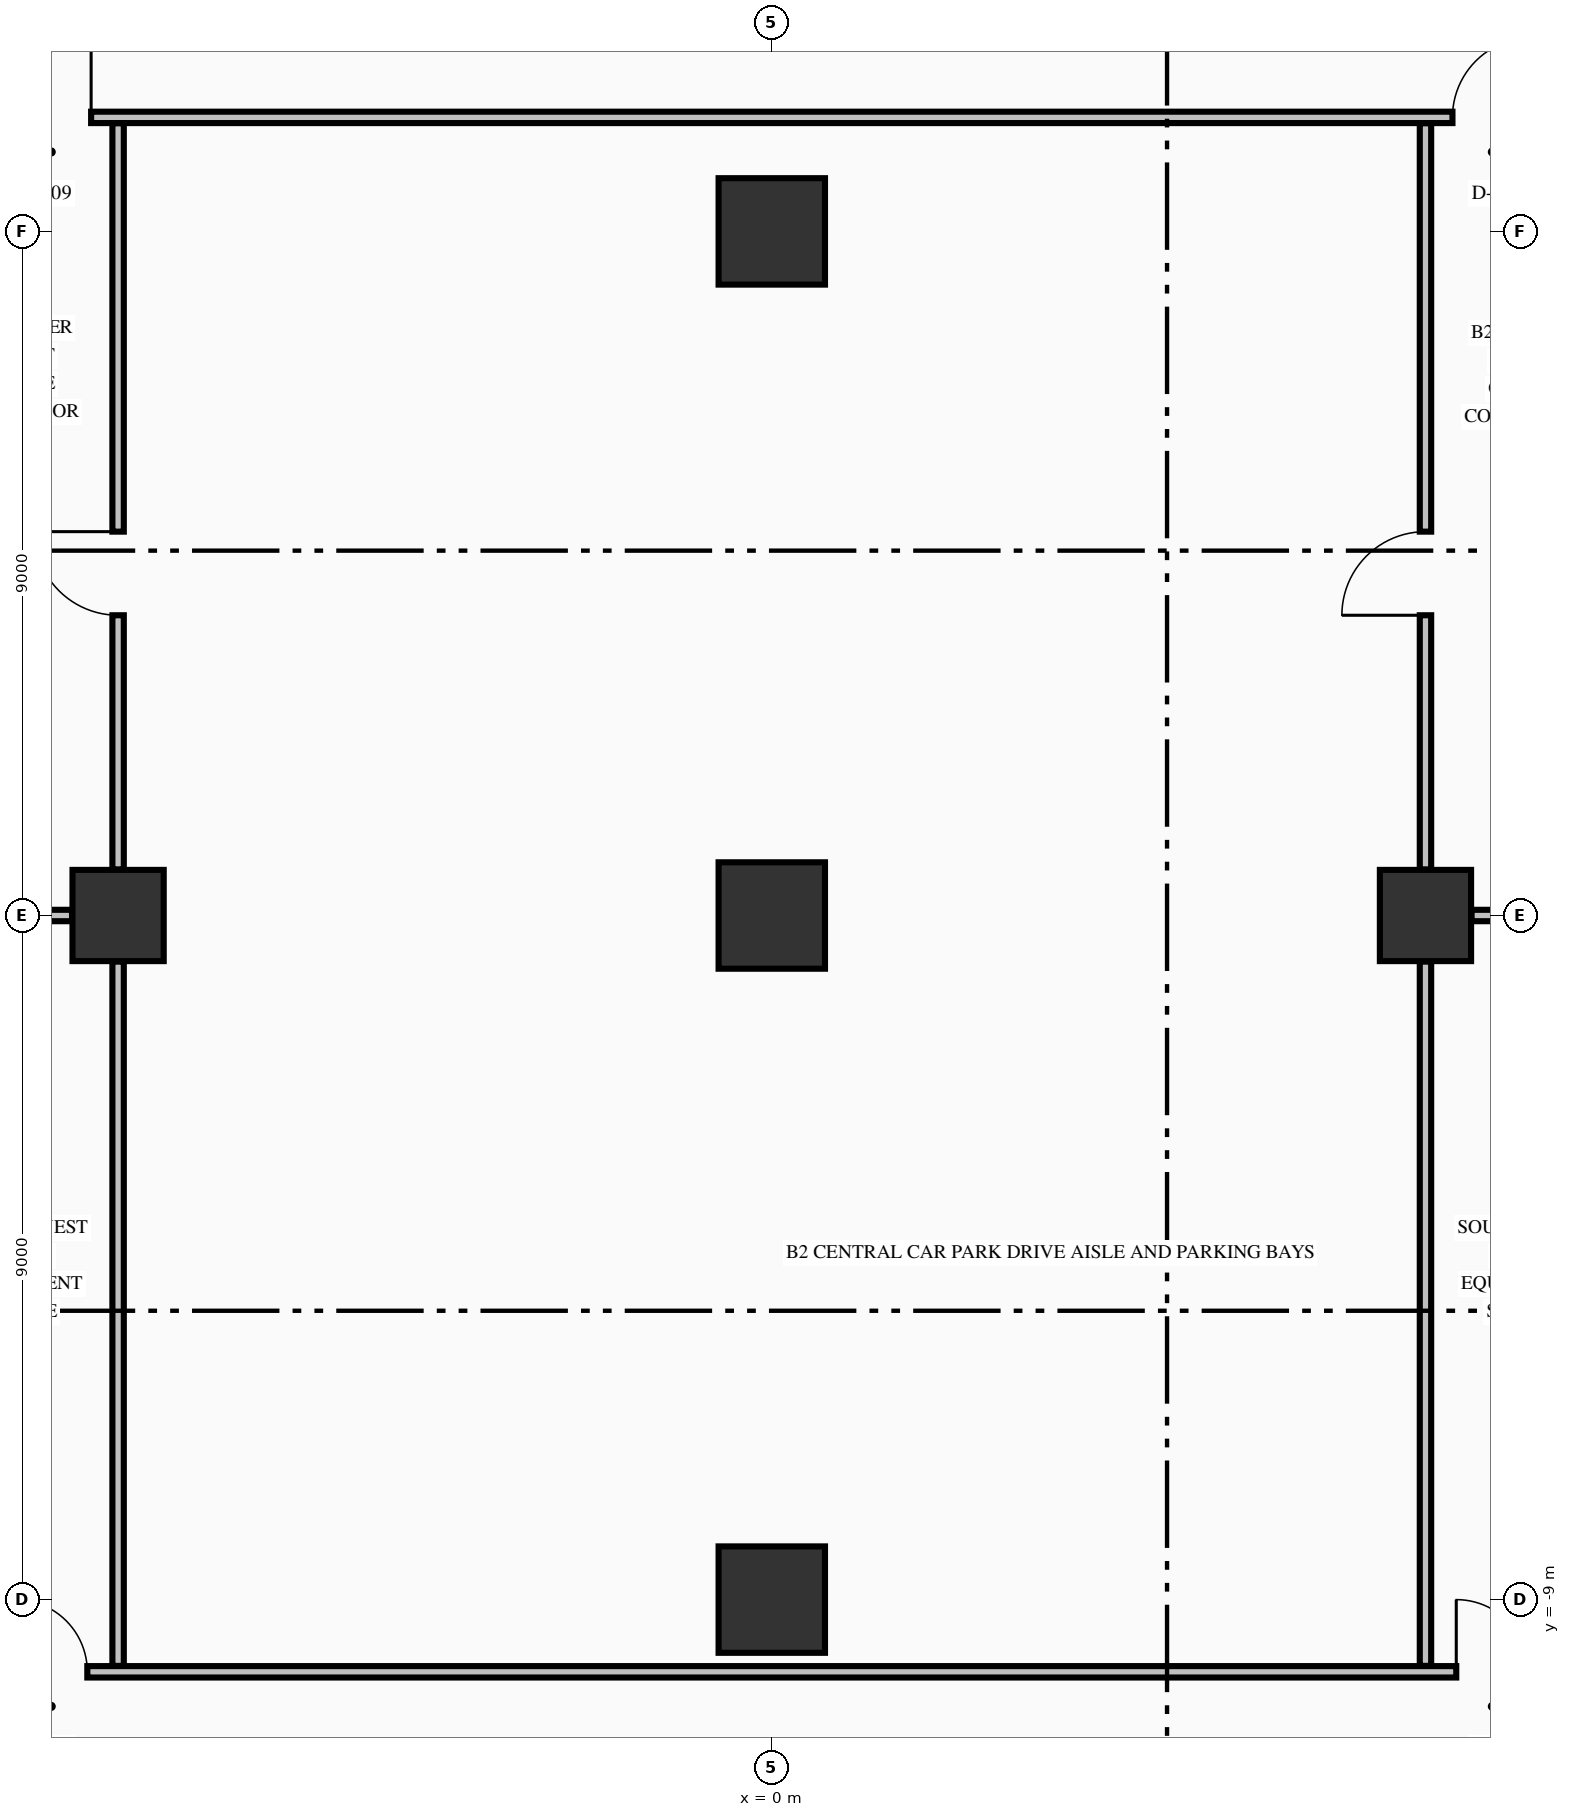
"""IFC4 building model, lengths in metres.
Left out: names, types, materials, properties, quantities, classifications, styles, units other than length and angle.
Written with IfcOpenShell. Run it as: python <this file> out.ifc"""

import sys

from ifc_helpers import new_model, si_unit, direction, frame, frame_2d, origin, origin_2d, place, context, subcontext, project, spatial, rectangle, extrude, element, fill, save


model = new_model("IFC4")
c1 = context("Model", 3, precision=1e-05, world=origin(), true_north=direction((0.0, 1.0)))
c2 = subcontext(c1, "Body", "Model", "MODEL_VIEW")
j1 = project(units=[si_unit("LENGTHUNIT", "METRE"), si_unit("PLANEANGLEUNIT", "RADIAN")], contexts=[c1])
p1 = place(None, origin())
s1 = spatial("IfcSite", under=j1, at=p1, CompositionType="ELEMENT")
p2 = place(p1, origin())
s2 = spatial("IfcBuilding", under=s1, at=p2, CompositionType="ELEMENT")
p3 = place(p2, frame((0.0, 0.0, -9.1)))
s3 = spatial("IfcBuildingStorey", under=s2, at=p3, CompositionType="ELEMENT", Elevation=-9.1)
for number, where, z_axis, x_axis in (
    (1, (0.0, -9.0, -0.45), (0.0, 0.0, 1.0), (1.0, 0.0, 0.0)),
    (2, (0.0, 0.0, -0.45), (0.0, 0.0, 1.0), (1.0, 0.0, 0.0)),
    (3, (0.0, 9.0, -0.45), (0.0, 0.0, 1.0), (1.0, 0.0, 0.0)),
):
    element("IfcColumn", number, at=place(p3, frame(where, z_axis=z_axis, x_axis=x_axis)), inside=s3, PredefinedType="COLUMN", context=c2, shape_type="SweptSolid", body=[
        extrude(rectangle(XDim=1.4, YDim=1.4, at=origin_2d()), origin(), (0.0, 0.0, 1.0), 4.65),
    ])
for number, where, z_axis, x_axis in (
    (4, (-8.6, 0.0, -0.45), (0.0, 0.0, 1.0), (1.0, 0.0, 0.0)),
    (5, (8.6, 0.0, -0.45), (0.0, 0.0, 1.0), (1.0, 0.0, 0.0)),
):
    element("IfcColumn", number, at=place(p3, frame(where, z_axis=z_axis, x_axis=x_axis)), inside=s3, PredefinedType="COLUMN", context=c2, shape_type="SweptSolid", body=[
        extrude(rectangle(XDim=1.2, YDim=1.2, at=origin_2d()), origin(), (0.0, 0.0, 1.0), 4.65),
    ])
p4 = place(p3, frame((-11.0, -9.95, 0.0), z_axis=(0.0, 0.0, 1.0), x_axis=(1.0, 0.0, 0.0)))
e6 = element("IfcWall", 6, at=p4, inside=s3, PredefinedType="PARTITIONING", context=c2, shape_type="SweptSolid", body=[
    extrude(rectangle(XDim=22.0, YDim=0.15, at=frame_2d((11.0, 0.0))), origin(), (0.0, 0.0, 1.0), 4.2),
])
p5 = place(p4, frame((1.045, 0.0, 0.0)))
e7 = element("IfcOpeningElement", 7, at=p5, cuts=e6, PredefinedType="OPENING", context=c2, shape_type="SweptSolid", body=[
    extrude(rectangle(XDim=0.95, YDim=2.15, at=frame_2d((0.475, 1.075))), frame((0.0, 0.085, 0.0), z_axis=(0.0, -1.0, 0.0), x_axis=(1.0, 0.0, 0.0)), (0.0, 0.0, 1.0), 0.17),
])
p6 = place(p4, frame((20.005, 0.0, 0.0)))
e8 = element("IfcOpeningElement", 8, at=p6, cuts=e6, PredefinedType="OPENING", context=c2, shape_type="SweptSolid", body=[
    extrude(rectangle(XDim=0.95, YDim=2.15, at=frame_2d((0.475, 1.075))), frame((0.0, 0.085, 0.0), z_axis=(0.0, -1.0, 0.0), x_axis=(1.0, 0.0, 0.0)), (0.0, 0.0, 1.0), 0.17),
])
for number, where, z_axis, x_axis in (
    (9, (-10.194, 0.0, 0.0), (0.0, 0.0, 1.0), (1.0, 0.0, 0.0)),
    (10, (9.206, 0.0, 0.0), (0.0, 0.0, 1.0), (1.0, 0.0, 0.0)),
):
    element("IfcWall", number, at=place(p3, frame(where, z_axis=z_axis, x_axis=x_axis)), inside=s3, PredefinedType="PARTITIONING", context=c2, shape_type="SweptSolid", body=[
        extrude(rectangle(XDim=0.988, YDim=0.15, at=frame_2d((0.494, 0.0))), origin(), (0.0, 0.0, 1.0), 3.242),
    ])
p7 = place(p3, frame((-11.0, 10.5, 0.0), z_axis=(0.0, 0.0, 1.0), x_axis=(1.0, 0.0, 0.0)))
e11 = element("IfcWall", 11, at=p7, inside=s3, PredefinedType="PARTITIONING", context=c2, shape_type="SweptSolid", body=[
    extrude(rectangle(XDim=22.0, YDim=0.15, at=frame_2d((11.0, 0.0))), origin(), (0.0, 0.0, 1.0), 4.2),
])
p8 = place(p7, frame((0.995, 0.0, 0.0)))
e12 = element("IfcOpeningElement", 12, at=p8, cuts=e11, PredefinedType="OPENING", context=c2, shape_type="SweptSolid", body=[
    extrude(rectangle(XDim=1.05, YDim=2.15, at=frame_2d((0.525, 1.075))), frame((0.0, 0.085, 0.0), z_axis=(0.0, -1.0, 0.0), x_axis=(1.0, 0.0, 0.0)), (0.0, 0.0, 1.0), 0.17),
])
p9 = place(p7, frame((19.955, 0.0, 0.0)))
e13 = element("IfcOpeningElement", 13, at=p9, cuts=e11, PredefinedType="OPENING", context=c2, shape_type="SweptSolid", body=[
    extrude(rectangle(XDim=1.05, YDim=2.15, at=frame_2d((0.525, 1.075))), frame((0.0, 0.085, 0.0), z_axis=(0.0, -1.0, 0.0), x_axis=(1.0, 0.0, 0.0)), (0.0, 0.0, 1.0), 0.17),
])
p10 = place(p3, frame((-8.6, -9.872, 0.0), z_axis=(0.0, 0.0, 1.0), x_axis=(0.0, 1.0, 0.0)))
e14 = element("IfcWall", 14, at=p10, inside=s3, PredefinedType="PARTITIONING", context=c2, shape_type="SweptSolid", body=[
    extrude(rectangle(XDim=9.266, YDim=0.15, at=frame_2d((4.633, 0.0))), origin(), (0.0, 0.0, 1.0), 4.2),
])
p11 = place(p3, frame((-8.6, 0.606, 0.0), z_axis=(0.0, 0.0, 1.0), x_axis=(0.0, 1.0, 0.0)))
e15 = element("IfcWall", 15, at=p11, inside=s3, PredefinedType="PARTITIONING", context=c2, shape_type="SweptSolid", body=[
    extrude(rectangle(XDim=9.816, YDim=0.15, at=frame_2d((4.908, 0.0))), origin(), (0.0, 0.0, 1.0), 3.242),
])
p12 = place(p11, frame((3.344, 0.0, 0.0)))
e16 = element("IfcOpeningElement", 16, at=p12, cuts=e15, PredefinedType="OPENING", context=c2, shape_type="SweptSolid", body=[
    extrude(rectangle(XDim=1.1, YDim=2.15, at=frame_2d((0.55, 1.075))), frame((0.0, 0.085, 0.0), z_axis=(0.0, -1.0, 0.0), x_axis=(1.0, 0.0, 0.0)), (0.0, 0.0, 1.0), 0.17),
])
p13 = place(p3, frame((8.6, -9.872, 0.0), z_axis=(0.0, 0.0, 1.0), x_axis=(0.0, 1.0, 0.0)))
e17 = element("IfcWall", 17, at=p13, inside=s3, PredefinedType="PARTITIONING", context=c2, shape_type="SweptSolid", body=[
    extrude(rectangle(XDim=9.266, YDim=0.15, at=frame_2d((4.633, 0.0))), origin(), (0.0, 0.0, 1.0), 4.2),
])
p14 = place(p3, frame((8.6, 0.606, 0.0), z_axis=(0.0, 0.0, 1.0), x_axis=(0.0, 1.0, 0.0)))
e18 = element("IfcWall", 18, at=p14, inside=s3, PredefinedType="PARTITIONING", context=c2, shape_type="SweptSolid", body=[
    extrude(rectangle(XDim=9.816, YDim=0.15, at=frame_2d((4.908, 0.0))), origin(), (0.0, 0.0, 1.0), 3.242),
])
p15 = place(p14, frame((3.344, 0.0, 0.0)))
e19 = element("IfcOpeningElement", 19, at=p15, cuts=e18, PredefinedType="OPENING", context=c2, shape_type="SweptSolid", body=[
    extrude(rectangle(XDim=1.1, YDim=2.15, at=frame_2d((0.55, 1.075))), frame((0.0, 0.085, 0.0), z_axis=(0.0, -1.0, 0.0), x_axis=(1.0, 0.0, 0.0)), (0.0, 0.0, 1.0), 0.17),
])
p16 = place(p8, origin())
e20 = element("IfcDoor", 20, at=p16, inside=s3, OperationType="SINGLE_SWING_RIGHT", PredefinedType="DOOR", context=c2, shape_type="SweptSolid", body=[
    extrude(rectangle(XDim=1.05, YDim=2.15, at=frame_2d((0.525, 1.075))), frame((0.0, 0.025, 0.0), z_axis=(0.0, -1.0, 0.0), x_axis=(1.0, 0.0, 0.0)), (0.0, 0.0, 1.0), 0.05),
])
fill(e12, e20)
p17 = place(p5, origin())
e21 = element("IfcDoor", 21, at=p17, inside=s3, OperationType="SINGLE_SWING_LEFT", PredefinedType="DOOR", context=c2, shape_type="SweptSolid", body=[
    extrude(rectangle(XDim=0.95, YDim=2.15, at=frame_2d((0.475, 1.075))), frame((0.0, 0.025, 0.0), z_axis=(0.0, -1.0, 0.0), x_axis=(1.0, 0.0, 0.0)), (0.0, 0.0, 1.0), 0.05),
])
fill(e7, e21)
p18 = place(p9, origin())
e22 = element("IfcDoor", 22, at=p18, inside=s3, OperationType="SINGLE_SWING_RIGHT", PredefinedType="DOOR", context=c2, shape_type="SweptSolid", body=[
    extrude(rectangle(XDim=1.05, YDim=2.15, at=frame_2d((0.525, 1.075))), frame((0.0, 0.025, 0.0), z_axis=(0.0, -1.0, 0.0), x_axis=(1.0, 0.0, 0.0)), (0.0, 0.0, 1.0), 0.05),
])
fill(e13, e22)
p19 = place(p6, origin())
e23 = element("IfcDoor", 23, at=p19, inside=s3, OperationType="SINGLE_SWING_LEFT", PredefinedType="DOOR", context=c2, shape_type="SweptSolid", body=[
    extrude(rectangle(XDim=0.95, YDim=2.15, at=frame_2d((0.475, 1.075))), frame((0.0, 0.025, 0.0), z_axis=(0.0, -1.0, 0.0), x_axis=(1.0, 0.0, 0.0)), (0.0, 0.0, 1.0), 0.05),
])
fill(e8, e23)
p20 = place(p12, origin())
e24 = element("IfcDoor", 24, at=p20, inside=s3, OperationType="SINGLE_SWING_RIGHT", PredefinedType="DOOR", context=c2, shape_type="SweptSolid", body=[
    extrude(rectangle(XDim=1.1, YDim=2.15, at=frame_2d((0.55, 1.075))), frame((0.0, 0.025, 0.0), z_axis=(0.0, -1.0, 0.0), x_axis=(1.0, 0.0, 0.0)), (0.0, 0.0, 1.0), 0.05),
])
fill(e16, e24)
p21 = place(p15, origin())
e25 = element("IfcDoor", 25, at=p21, inside=s3, OperationType="SINGLE_SWING_LEFT", PredefinedType="DOOR", context=c2, shape_type="SweptSolid", body=[
    extrude(rectangle(XDim=1.1, YDim=2.15, at=frame_2d((0.55, 1.075))), frame((0.0, 0.025, 0.0), z_axis=(0.0, -1.0, 0.0), x_axis=(1.0, 0.0, 0.0)), (0.0, 0.0, 1.0), 0.05),
])
fill(e19, e25)
save(model, sys.argv[1])
